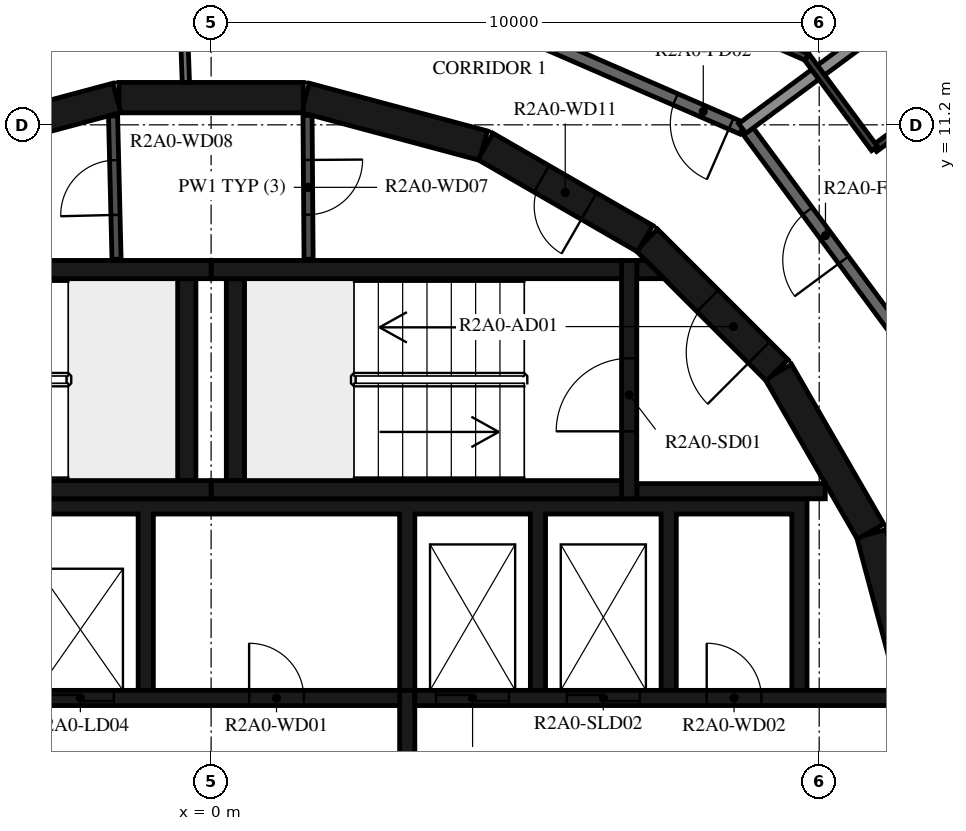
"""IFC4 building model, lengths in metres.
Left out: names, types, materials, properties, quantities, classifications, styles, units other than length and angle.
Written with IfcOpenShell. Run it as: python <this file> out.ifc"""

import sys

from ifc_helpers import new_model, si_unit, direction, frame, frame_2d, origin, place, context, subcontext, project, spatial, polyline, rectangle, outline, extrude, element, fill, save


model = new_model("IFC4")
c1 = context("Model", 3, precision=1e-05, world=origin(), true_north=direction((0.0, 1.0)))
c2 = subcontext(c1, "Body", "Model", "MODEL_VIEW")
j1 = project(units=[si_unit("LENGTHUNIT", "METRE"), si_unit("PLANEANGLEUNIT", "RADIAN")], contexts=[c1])
p1 = place(None, origin())
s1 = spatial("IfcSite", under=j1, at=p1, CompositionType="ELEMENT")
p2 = place(p1, origin())
s2 = spatial("IfcBuilding", under=s1, at=p2, CompositionType="ELEMENT")
p3 = place(p2, frame((0.0, 0.0, 83.7)))
s3 = spatial("IfcBuildingStorey", under=s2, at=p3, CompositionType="ELEMENT", Elevation=83.7)
for number, where, z_axis, x_axis in (
    (1, (11.643, 1.55, 0.0), (0.0, 0.0, 1.0), (-0.259, 0.966, 0.0)),
    (2, (10.845, 4.51, 0.0), (0.0, 0.0, 1.0), (-0.5, 0.866, 0.0)),
):
    element("IfcWall", number, at=place(p3, frame(where, z_axis=z_axis, x_axis=x_axis)), inside=s3, PredefinedType="SHEAR", context=c2, shape_type="SweptSolid", body=[
        extrude(rectangle(XDim=3.033, YDim=0.5, at=frame_2d((1.516, 0.0))), origin(), (0.0, 0.0, 1.0), 3.12),
    ])
p4 = place(p3, frame((9.308, 7.164, 0.0), z_axis=(0.0, 0.0, 1.0), x_axis=(-0.707106781187, 0.707106781187, 0.0)))
e3 = element("IfcWall", 3, at=p4, inside=s3, PredefinedType="SHEAR", context=c2, shape_type="SweptSolid", body=[
    extrude(rectangle(XDim=3.032, YDim=0.5, at=frame_2d((1.516, 0.0))), origin(), (0.0, 0.0, 1.0), 3.12),
])
p5 = place(p4, frame((0.416, 0.0, 0.0)))
e4 = element("IfcOpeningElement", 4, at=p5, cuts=e3, PredefinedType="OPENING", context=c2, shape_type="SweptSolid", body=[
    extrude(rectangle(XDim=1.2, YDim=2.1, at=frame_2d((0.6, 1.05))), frame((0.0, 0.26, 0.0), z_axis=(0.0, -1.0, 0.0), x_axis=(1.0, 0.0, 0.0)), (0.0, 0.0, 1.0), 0.52),
])
p6 = place(p3, frame((7.137, 9.329, 0.0), z_axis=(0.0, 0.0, 1.0), x_axis=(-0.865975092491, 0.500087131594, 0.0)))
e5 = element("IfcWall", 5, at=p6, inside=s3, PredefinedType="SHEAR", context=c2, shape_type="SweptSolid", body=[
    extrude(rectangle(XDim=3.033, YDim=0.5, at=frame_2d((1.516, 0.0))), origin(), (0.0, 0.0, 1.0), 3.12),
])
p7 = place(p6, frame((1.066, 0.0, 0.0)))
e6 = element("IfcOpeningElement", 6, at=p7, cuts=e5, PredefinedType="OPENING", context=c2, shape_type="SweptSolid", body=[
    extrude(rectangle(XDim=0.9, YDim=2.1, at=frame_2d((0.45, 1.05))), frame((0.0, 0.26, 0.0), z_axis=(0.0, -1.0, 0.0), x_axis=(1.0, 0.0, 0.0)), (0.0, 0.0, 1.0), 0.52),
])
for number, where, z_axis, x_axis in (
    (7, (4.479, 10.858, 0.0), (0.0, 0.0, 1.0), (-0.966, 0.259, 0.0)),
    (8, (1.516, 11.647, 0.0), (0.0, 0.0, 1.0), (-1.0, 0.0, 0.0)),
    (9, (-1.55, 11.643, 0.0), (0.0, 0.0, 1.0), (-0.966, -0.259, 0.0)),
):
    element("IfcWall", number, at=place(p3, frame(where, z_axis=z_axis, x_axis=x_axis)), inside=s3, PredefinedType="SHEAR", context=c2, shape_type="SweptSolid", body=[
        extrude(rectangle(XDim=3.033, YDim=0.5, at=frame_2d((1.516, 0.0))), origin(), (0.0, 0.0, 1.0), 3.12),
    ])
for number, where, z_axis, x_axis in (
    (10, (0.0, 5.2, 0.0), (0.0, 0.0, 1.0), (1.0, 0.0, 0.0)),
    (11, (0.0, 8.82, 0.0), (0.0, 0.0, 1.0), (1.0, 0.0, 0.0)),
):
    element("IfcWall", number, at=place(p3, frame(where, z_axis=z_axis, x_axis=x_axis)), inside=s3, PredefinedType="SHEAR", context=c2, shape_type="SweptSolid", body=[
        extrude(rectangle(XDim=6.75, YDim=0.3, at=frame_2d((3.375, 0.0))), origin(), (0.0, 0.0, 1.0), 3.12),
    ])
p8 = place(p3, frame((0.4, 5.35, 0.0), z_axis=(0.0, 0.0, 1.0), x_axis=(0.0, 1.0, 0.0)))
e12 = element("IfcWall", 12, at=p8, inside=s3, PredefinedType="SHEAR", context=c2, shape_type="SweptSolid", body=[
    extrude(rectangle(XDim=3.32, YDim=0.3, at=frame_2d((1.66, 0.0))), origin(), (0.0, 0.0, 1.0), 3.12),
])
p9 = place(p3, frame((6.875, 5.05, 0.0), z_axis=(0.0, 0.0, 1.0), x_axis=(0.0, 1.0, 0.0)))
e13 = element("IfcWall", 13, at=p9, inside=s3, PredefinedType="SHEAR", context=c2, shape_type="SweptSolid", body=[
    extrude(rectangle(XDim=3.92, YDim=0.25, at=frame_2d((1.96, 0.0))), origin(), (0.0, 0.0, 1.0), 3.12),
])
p10 = place(p9, frame((1.11, 0.0, 0.0)))
e14 = element("IfcOpeningElement", 14, at=p10, cuts=e13, PredefinedType="OPENING", context=c2, shape_type="SweptSolid", body=[
    extrude(rectangle(XDim=1.2, YDim=2.1, at=frame_2d((0.6, 1.05))), frame((0.0, 0.135, 0.0), z_axis=(0.0, -1.0, 0.0), x_axis=(1.0, 0.0, 0.0)), (0.0, 0.0, 1.0), 0.27),
])
p11 = place(p3, frame((7.0, 5.175, 0.0), z_axis=(0.0, 0.0, 1.0), x_axis=(1.0, 0.0, 0.0)))
e15 = element("IfcWall", 15, at=p11, inside=s3, PredefinedType="SHEAR", context=c2, shape_type="SweptSolid", body=[
    extrude(rectangle(XDim=3.1, YDim=0.25, at=frame_2d((1.55, 0.0))), origin(), (0.0, 0.0, 1.0), 3.12),
])
p12 = place(p3, origin())
e16 = element("IfcWall", 16, at=p12, inside=s3, PredefinedType="SHEAR", context=c2, shape_type="SweptSolid", body=[
    extrude(outline(polyline([(7.448, 8.67), (7.0, 8.67), (7.0, 8.97), (7.148, 8.97), (7.448, 8.67)])), origin(), (0.0, 0.0, 1.0), 3.12),
])
for number, where, z_axis, x_axis in (
    (17, (-6.75, 5.2, 0.0), (0.0, 0.0, 1.0), (1.0, 0.0, 0.0)),
    (18, (-6.75, 8.82, 0.0), (0.0, 0.0, 1.0), (1.0, 0.0, 0.0)),
):
    element("IfcWall", number, at=place(p3, frame(where, z_axis=z_axis, x_axis=x_axis)), inside=s3, PredefinedType="SHEAR", context=c2, shape_type="SweptSolid", body=[
        extrude(rectangle(XDim=6.75, YDim=0.3, at=frame_2d((3.375, 0.0))), origin(), (0.0, 0.0, 1.0), 3.12),
    ])
p13 = place(p3, frame((-0.4, 5.35, 0.0), z_axis=(0.0, 0.0, 1.0), x_axis=(0.0, 1.0, 0.0)))
e19 = element("IfcWall", 19, at=p13, inside=s3, PredefinedType="SHEAR", context=c2, shape_type="SweptSolid", body=[
    extrude(rectangle(XDim=3.32, YDim=0.3, at=frame_2d((1.66, 0.0))), origin(), (0.0, 0.0, 1.0), 3.12),
])
p14 = place(p3, origin())
e20 = element("IfcWall", 20, at=p14, inside=s3, PredefinedType="SHEAR", context=c2, shape_type="SweptSolid", body=[
    extrude(outline(polyline([(-9.55, 4.8), (-7.65, 4.8), (-7.65, 1.9), (-7.4, 1.9), (-7.4, 4.8), (-5.5, 4.8), (-5.5, 1.9), (-5.25, 1.9), (-5.25, 4.8), (-3.35, 4.8), (-3.35, 1.9), (-3.1, 1.9), (-3.1, 4.8), (-1.2, 4.8), (-1.2, 1.9), (-0.95, 1.9), (-0.95, 4.8), (3.1, 4.8), (3.1, 1.9), (3.35, 1.9), (3.35, 4.8), (5.25, 4.8), (5.25, 1.9), (5.5, 1.9), (5.5, 4.8), (7.4, 4.8), (7.4, 1.9), (7.65, 1.9), (7.65, 4.8), (9.55, 4.8), (9.55, 1.9), (9.8, 1.9), (9.8, 4.8), (9.8, 5.05), (-9.8, 5.05), (-9.8, 4.8), (-9.8, 1.9), (-9.55, 1.9), (-9.55, 4.8)])), origin(), (0.0, 0.0, 1.0), 3.12),
])
p15 = place(p3, frame((-11.28, 1.775, 0.0), z_axis=(0.0, 0.0, 1.0), x_axis=(1.0, 0.0, 0.0)))
e21 = element("IfcWall", 21, at=p15, inside=s3, PredefinedType="SHEAR", context=c2, shape_type="SweptSolid", body=[
    extrude(rectangle(XDim=14.38, YDim=0.25, at=frame_2d((7.19, 0.0))), origin(), (0.0, 0.0, 1.0), 3.12),
])
p16 = place(p15, frame((2.13, 0.0, 0.0)))
e22 = element("IfcOpeningElement", 22, at=p16, cuts=e21, PredefinedType="OPENING", context=c2, shape_type="SweptSolid", body=[
    extrude(rectangle(XDim=1.1, YDim=2.1, at=frame_2d((0.55, 1.05))), frame((0.0, 0.135, 0.0), z_axis=(0.0, -1.0, 0.0), x_axis=(1.0, 0.0, 0.0)), (0.0, 0.0, 1.0), 0.27),
])
p17 = place(p15, frame((4.28, 0.0, 0.0)))
e23 = element("IfcOpeningElement", 23, at=p17, cuts=e21, PredefinedType="OPENING", context=c2, shape_type="SweptSolid", body=[
    extrude(rectangle(XDim=1.1, YDim=2.1, at=frame_2d((0.55, 1.05))), frame((0.0, 0.135, 0.0), z_axis=(0.0, -1.0, 0.0), x_axis=(1.0, 0.0, 0.0)), (0.0, 0.0, 1.0), 0.27),
])
p18 = place(p15, frame((6.43, 0.0, 0.0)))
e24 = element("IfcOpeningElement", 24, at=p18, cuts=e21, PredefinedType="OPENING", context=c2, shape_type="SweptSolid", body=[
    extrude(rectangle(XDim=1.1, YDim=2.1, at=frame_2d((0.55, 1.05))), frame((0.0, 0.135, 0.0), z_axis=(0.0, -1.0, 0.0), x_axis=(1.0, 0.0, 0.0)), (0.0, 0.0, 1.0), 0.27),
])
p19 = place(p15, frame((8.58, 0.0, 0.0)))
e25 = element("IfcOpeningElement", 25, at=p19, cuts=e21, PredefinedType="OPENING", context=c2, shape_type="SweptSolid", body=[
    extrude(rectangle(XDim=1.1, YDim=2.1, at=frame_2d((0.55, 1.05))), frame((0.0, 0.135, 0.0), z_axis=(0.0, -1.0, 0.0), x_axis=(1.0, 0.0, 0.0)), (0.0, 0.0, 1.0), 0.27),
])
p20 = place(p15, frame((11.905, 0.0, 0.0)))
e26 = element("IfcOpeningElement", 26, at=p20, cuts=e21, PredefinedType="OPENING", context=c2, shape_type="SweptSolid", body=[
    extrude(rectangle(XDim=0.9, YDim=2.1, at=frame_2d((0.45, 1.05))), frame((0.0, 0.135, 0.0), z_axis=(0.0, -1.0, 0.0), x_axis=(1.0, 0.0, 0.0)), (0.0, 0.0, 1.0), 0.27),
])
p21 = place(p3, frame((3.35, 1.775, 0.0), z_axis=(0.0, 0.0, 1.0), x_axis=(1.0, 0.0, 0.0)))
e27 = element("IfcWall", 27, at=p21, inside=s3, PredefinedType="SHEAR", context=c2, shape_type="SweptSolid", body=[
    extrude(rectangle(XDim=7.93, YDim=0.25, at=frame_2d((3.965, 0.0))), origin(), (0.0, 0.0, 1.0), 3.12),
])
p22 = place(p21, frame((0.35, 0.0, 0.0)))
e28 = element("IfcOpeningElement", 28, at=p22, cuts=e27, PredefinedType="OPENING", context=c2, shape_type="SweptSolid", body=[
    extrude(rectangle(XDim=1.2, YDim=2.4, at=frame_2d((0.6, 1.2))), frame((0.0, 0.135, 0.0), z_axis=(0.0, -1.0, 0.0), x_axis=(1.0, 0.0, 0.0)), (0.0, 0.0, 1.0), 0.27),
])
p23 = place(p21, frame((2.5, 0.0, 0.0)))
e29 = element("IfcOpeningElement", 29, at=p23, cuts=e27, PredefinedType="OPENING", context=c2, shape_type="SweptSolid", body=[
    extrude(rectangle(XDim=1.2, YDim=2.4, at=frame_2d((0.6, 1.2))), frame((0.0, 0.135, 0.0), z_axis=(0.0, -1.0, 0.0), x_axis=(1.0, 0.0, 0.0)), (0.0, 0.0, 1.0), 0.27),
])
p24 = place(p21, frame((4.8, 0.0, 0.0)))
e30 = element("IfcOpeningElement", 30, at=p24, cuts=e27, PredefinedType="OPENING", context=c2, shape_type="SweptSolid", body=[
    extrude(rectangle(XDim=0.9, YDim=2.1, at=frame_2d((0.45, 1.05))), frame((0.0, 0.135, 0.0), z_axis=(0.0, -1.0, 0.0), x_axis=(1.0, 0.0, 0.0)), (0.0, 0.0, 1.0), 0.27),
])
p25 = place(p3, frame((3.225, -1.9, 0.0), z_axis=(0.0, 0.0, 1.0), x_axis=(0.0, 1.0, 0.0)))
e31 = element("IfcWall", 31, at=p25, inside=s3, PredefinedType="SHEAR", context=c2, shape_type="SweptSolid", body=[
    extrude(rectangle(XDim=3.8, YDim=0.25, at=frame_2d((1.9, 0.0))), origin(), (0.0, 0.0, 1.0), 3.12),
])
p26 = place(p3, frame((1.586, 11.354, 0.0), z_axis=(0.0, 0.0, 1.0), x_axis=(0.007227482881, -0.999973881405, 0.0)))
e32 = element("IfcWall", 32, at=p26, inside=s3, PredefinedType="PARTITIONING", context=c2, shape_type="SweptSolid", body=[
    extrude(rectangle(XDim=2.365, YDim=0.15, at=frame_2d((1.182, 0.0))), origin(), (0.0, 0.0, 1.0), 3.12),
])
p27 = place(p26, frame((0.732, 0.0, 0.0)))
e33 = element("IfcOpeningElement", 33, at=p27, cuts=e32, PredefinedType="OPENING", context=c2, shape_type="SweptSolid", body=[
    extrude(rectangle(XDim=0.9, YDim=2.1, at=frame_2d((0.45, 1.05))), frame((0.0, 0.085, 0.0), z_axis=(0.0, -1.0, 0.0), x_axis=(1.0, 0.0, 0.0)), (0.0, 0.0, 1.0), 0.17),
])
p28 = place(p3, frame((-1.555, 8.99, 0.0), z_axis=(0.0, 0.0, 1.0), x_axis=(-0.024125549686, 0.999708936567, 0.0)))
e34 = element("IfcWall", 34, at=p28, inside=s3, PredefinedType="PARTITIONING", context=c2, shape_type="SweptSolid", body=[
    extrude(rectangle(XDim=2.358, YDim=0.15, at=frame_2d((1.179, 0.0))), origin(), (0.0, 0.0, 1.0), 3.12),
])
p29 = place(p28, frame((0.729, 0.0, 0.0)))
e35 = element("IfcOpeningElement", 35, at=p29, cuts=e34, PredefinedType="OPENING", context=c2, shape_type="SweptSolid", body=[
    extrude(rectangle(XDim=0.9, YDim=2.1, at=frame_2d((0.45, 1.05))), frame((0.0, 0.085, 0.0), z_axis=(0.0, -1.0, 0.0), x_axis=(1.0, 0.0, 0.0)), (0.0, 0.0, 1.0), 0.17),
])
p30 = place(p3, frame((-0.479, 13.734, 0.0), z_axis=(0.0, 0.0, 1.0), x_axis=(0.034805430832, -0.999394107439, 0.0)))
e36 = element("IfcWall", 36, at=p30, inside=s3, PredefinedType="PARTITIONING", context=c2, shape_type="SweptSolid", body=[
    extrude(rectangle(XDim=1.838, YDim=0.12, at=frame_2d((0.919, 0.0))), origin(), (0.0, 0.0, 1.0), 3.12),
])
p31 = place(p30, frame((0.115, 0.0, 0.0)))
e37 = element("IfcOpeningElement", 37, at=p31, cuts=e36, PredefinedType="OPENING", context=c2, shape_type="SweptSolid", body=[
    extrude(rectangle(XDim=1.2, YDim=2.1, at=frame_2d((0.6, 1.05))), frame((0.0, 0.07, 0.0), z_axis=(0.0, -1.0, 0.0), x_axis=(1.0, 0.0, 0.0)), (0.0, 0.0, 1.0), 0.14),
])
p32 = place(p3, frame((13.196, 5.198, 0.0), z_axis=(0.0, 0.0, 1.0), x_axis=(-0.594805187394, 0.803869883159, 0.0)))
e38 = element("IfcWall", 38, at=p32, inside=s3, PredefinedType="STANDARD", context=c2, shape_type="SweptSolid", body=[
    extrude(rectangle(XDim=7.342, YDim=0.2, at=frame_2d((3.671, 0.0))), origin(), (0.0, 0.0, 1.0), 3.12),
])
p33 = place(p32, frame((4.7, 0.0, 0.0)))
e39 = element("IfcOpeningElement", 39, at=p33, cuts=e38, PredefinedType="OPENING", context=c2, shape_type="SweptSolid", body=[
    extrude(rectangle(XDim=1.0, YDim=2.1, at=frame_2d((0.5, 1.05))), frame((0.0, 0.11, 0.0), z_axis=(0.0, -1.0, 0.0), x_axis=(1.0, 0.0, 0.0)), (0.0, 0.0, 1.0), 0.22),
])
p34 = place(p3, frame((8.736, 11.141, 0.0), z_axis=(0.0, 0.0, 1.0), x_axis=(-0.917051290697, 0.398769269416, 0.0)))
e40 = element("IfcWall", 40, at=p34, inside=s3, PredefinedType="STANDARD", context=c2, shape_type="SweptSolid", body=[
    extrude(rectangle(XDim=7.24, YDim=0.2, at=frame_2d((3.62, 0.0))), origin(), (0.0, 0.0, 1.0), 3.12),
])
p35 = place(p34, frame((0.2, 0.0, 0.0)))
e41 = element("IfcOpeningElement", 41, at=p35, cuts=e40, PredefinedType="OPENING", context=c2, shape_type="SweptSolid", body=[
    extrude(rectangle(XDim=1.0, YDim=2.1, at=frame_2d((0.5, 1.05))), frame((0.0, 0.11, 0.0), z_axis=(0.0, -1.0, 0.0), x_axis=(1.0, 0.0, 0.0)), (0.0, 0.0, 1.0), 0.22),
])
p36 = place(p3, frame((13.244, 14.477, 0.0), z_axis=(0.0, 0.0, 1.0), x_axis=(-0.803853971109, -0.594826691677, 0.0)))
e42 = element("IfcWall", 42, at=p36, inside=s3, PredefinedType="STANDARD", context=c2, shape_type="SweptSolid", body=[
    extrude(rectangle(XDim=5.609, YDim=0.2, at=frame_2d((2.804, 0.0))), origin(), (0.0, 0.0, 1.0), 2.73),
])
p37 = place(p3, frame((13.448, 12.688, 0.0), z_axis=(0.0, 0.0, 1.0), x_axis=(-0.803843378098, -0.594841006898, 0.0)))
e43 = element("IfcWall", 43, at=p37, inside=s3, PredefinedType="PARTITIONING", context=c2, shape_type="SweptSolid", body=[
    extrude(rectangle(XDim=3.157, YDim=0.12, at=frame_2d((1.579, 0.0))), origin(), (0.0, 0.0, 1.0), 3.12),
])
p38 = place(p3, frame((10.91, 10.81, 0.0), z_axis=(0.0, 0.0, 1.0), x_axis=(-0.59489693125, 0.803801991282, 0.0)))
e44 = element("IfcWall", 44, at=p38, inside=s3, PredefinedType="PARTITIONING", context=c2, shape_type="SweptSolid", body=[
    extrude(rectangle(XDim=1.872, YDim=0.12, at=frame_2d((0.936, 0.0))), origin(), (0.0, 0.0, 1.0), 3.12),
])
p39 = place(p3, frame((9.796, 12.315, 0.0), z_axis=(0.0, 0.0, 1.0), x_axis=(-0.916973672273, 0.398947721335, 0.0)))
e45 = element("IfcWall", 45, at=p39, inside=s3, PredefinedType="PARTITIONING", context=c2, shape_type="SweptSolid", body=[
    extrude(rectangle(XDim=0.685, YDim=0.12, at=frame_2d((0.342, 0.0))), origin(), (0.0, 0.0, 1.0), 3.12),
])
p40 = place(p10, origin())
e46 = element("IfcDoor", 46, at=p40, inside=s3, OperationType="SINGLE_SWING_LEFT", PredefinedType="DOOR", context=c2, shape_type="SweptSolid", body=[
    extrude(rectangle(XDim=1.2, YDim=2.1, at=frame_2d((0.6, 1.05))), frame((0.0, 0.025, 0.0), z_axis=(0.0, -1.0, 0.0), x_axis=(1.0, 0.0, 0.0)), (0.0, 0.0, 1.0), 0.05),
])
fill(e14, e46)
p41 = place(p5, origin())
e47 = element("IfcDoor", 47, at=p41, inside=s3, OperationType="SINGLE_SWING_RIGHT", PredefinedType="DOOR", context=c2, shape_type="SweptSolid", body=[
    extrude(rectangle(XDim=1.2, YDim=2.1, at=frame_2d((0.6, 1.05))), frame((0.0, 0.025, 0.0), z_axis=(0.0, -1.0, 0.0), x_axis=(1.0, 0.0, 0.0)), (0.0, 0.0, 1.0), 0.05),
])
fill(e4, e47)
p42 = place(p19, origin())
e48 = element("IfcDoor", 48, at=p42, inside=s3, OperationType="DOUBLE_DOOR_SLIDING", PredefinedType="DOOR", context=c2, shape_type="SweptSolid", body=[
    extrude(rectangle(XDim=1.1, YDim=2.1, at=frame_2d((0.55, 1.05))), frame((0.0, 0.025, 0.0), z_axis=(0.0, -1.0, 0.0), x_axis=(1.0, 0.0, 0.0)), (0.0, 0.0, 1.0), 0.05),
])
fill(e25, e48)
p43 = place(p22, origin())
e49 = element("IfcDoor", 49, at=p43, inside=s3, OperationType="DOUBLE_DOOR_SLIDING", PredefinedType="DOOR", context=c2, shape_type="SweptSolid", body=[
    extrude(rectangle(XDim=1.2, YDim=2.4, at=frame_2d((0.6, 1.2))), frame((0.0, 0.025, 0.0), z_axis=(0.0, -1.0, 0.0), x_axis=(1.0, 0.0, 0.0)), (0.0, 0.0, 1.0), 0.05),
])
fill(e28, e49)
p44 = place(p23, origin())
e50 = element("IfcDoor", 50, at=p44, inside=s3, OperationType="DOUBLE_DOOR_SLIDING", PredefinedType="DOOR", context=c2, shape_type="SweptSolid", body=[
    extrude(rectangle(XDim=1.2, YDim=2.4, at=frame_2d((0.6, 1.2))), frame((0.0, 0.025, 0.0), z_axis=(0.0, -1.0, 0.0), x_axis=(1.0, 0.0, 0.0)), (0.0, 0.0, 1.0), 0.05),
])
fill(e29, e50)
p45 = place(p20, origin())
e51 = element("IfcDoor", 51, at=p45, inside=s3, OperationType="SINGLE_SWING_RIGHT", PredefinedType="DOOR", context=c2, shape_type="SweptSolid", body=[
    extrude(rectangle(XDim=0.9, YDim=2.1, at=frame_2d((0.45, 1.05))), frame((0.0, 0.025, 0.0), z_axis=(0.0, -1.0, 0.0), x_axis=(1.0, 0.0, 0.0)), (0.0, 0.0, 1.0), 0.05),
])
fill(e26, e51)
p46 = place(p24, origin())
e52 = element("IfcDoor", 52, at=p46, inside=s3, OperationType="SINGLE_SWING_LEFT", PredefinedType="DOOR", context=c2, shape_type="SweptSolid", body=[
    extrude(rectangle(XDim=0.9, YDim=2.1, at=frame_2d((0.45, 1.05))), frame((0.0, 0.025, 0.0), z_axis=(0.0, -1.0, 0.0), x_axis=(1.0, 0.0, 0.0)), (0.0, 0.0, 1.0), 0.05),
])
fill(e30, e52)
p47 = place(p27, origin())
e53 = element("IfcDoor", 53, at=p47, inside=s3, OperationType="SINGLE_SWING_RIGHT", PredefinedType="DOOR", context=c2, shape_type="SweptSolid", body=[
    extrude(rectangle(XDim=0.9, YDim=2.1, at=frame_2d((0.45, 1.05))), frame((0.0, 0.025, 0.0), z_axis=(0.0, -1.0, 0.0), x_axis=(1.0, 0.0, 0.0)), (0.0, 0.0, 1.0), 0.05),
])
fill(e33, e53)
p48 = place(p29, origin())
e54 = element("IfcDoor", 54, at=p48, inside=s3, OperationType="SINGLE_SWING_LEFT", PredefinedType="DOOR", context=c2, shape_type="SweptSolid", body=[
    extrude(rectangle(XDim=0.9, YDim=2.1, at=frame_2d((0.45, 1.05))), frame((0.0, 0.025, 0.0), z_axis=(0.0, -1.0, 0.0), x_axis=(1.0, 0.0, 0.0)), (0.0, 0.0, 1.0), 0.05),
])
fill(e35, e54)
p49 = place(p7, origin())
e55 = element("IfcDoor", 55, at=p49, inside=s3, OperationType="SINGLE_SWING_RIGHT", PredefinedType="DOOR", context=c2, shape_type="SweptSolid", body=[
    extrude(rectangle(XDim=0.9, YDim=2.1, at=frame_2d((0.45, 1.05))), frame((0.0, 0.025, 0.0), z_axis=(0.0, -1.0, 0.0), x_axis=(1.0, 0.0, 0.0)), (0.0, 0.0, 1.0), 0.05),
])
fill(e6, e55)
p50 = place(p33, origin())
e56 = element("IfcDoor", 56, at=p50, inside=s3, OperationType="SINGLE_SWING_RIGHT", PredefinedType="DOOR", context=c2, shape_type="SweptSolid", body=[
    extrude(rectangle(XDim=1.0, YDim=2.1, at=frame_2d((0.5, 1.05))), frame((0.0, 0.025, 0.0), z_axis=(0.0, -1.0, 0.0), x_axis=(1.0, 0.0, 0.0)), (0.0, 0.0, 1.0), 0.05),
])
fill(e39, e56)
p51 = place(p35, origin())
e57 = element("IfcDoor", 57, at=p51, inside=s3, OperationType="SINGLE_SWING_RIGHT", PredefinedType="DOOR", context=c2, shape_type="SweptSolid", body=[
    extrude(rectangle(XDim=1.0, YDim=2.1, at=frame_2d((0.5, 1.05))), frame((0.0, 0.025, 0.0), z_axis=(0.0, -1.0, 0.0), x_axis=(1.0, 0.0, 0.0)), (0.0, 0.0, 1.0), 0.05),
])
fill(e41, e57)
save(model, sys.argv[1])
